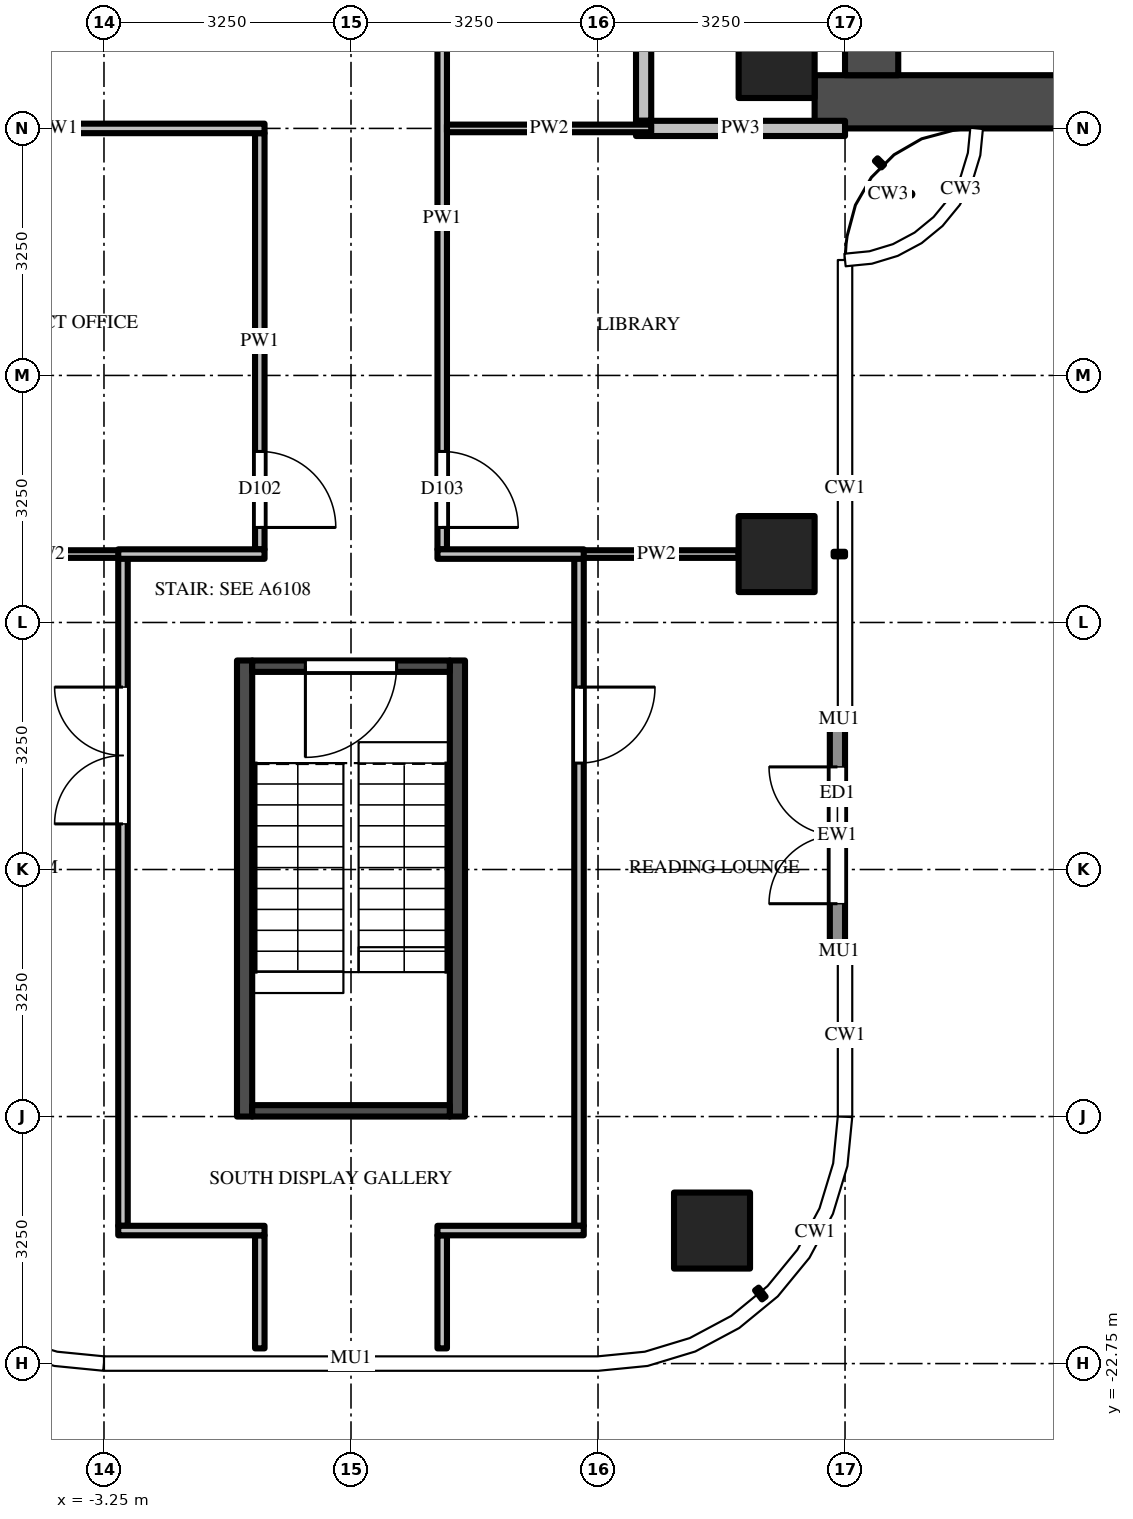
"""IFC4 building model, lengths in metres.
Left out: names, types, materials, properties, quantities, classifications, styles, units other than length and angle.
Written with IfcOpenShell. Run it as: python <this file> out.ifc"""

import sys

from ifc_helpers import new_model, si_unit, direction, frame, frame_2d, origin, origin_2d, place, context, subcontext, project, spatial, rectangle, extrude, source, transform, mapped, element, fill, save


model = new_model("IFC4")
c1 = context("Model", 3, precision=1e-05, world=origin(), true_north=direction((0.0, 1.0)))
c2 = subcontext(c1, "Body", "Model", "MODEL_VIEW")
j1 = project(units=[si_unit("LENGTHUNIT", "METRE"), si_unit("PLANEANGLEUNIT", "RADIAN")], contexts=[c1])
p1 = place(None, origin())
s1 = spatial("IfcSite", under=j1, at=p1, CompositionType="ELEMENT")
p2 = place(p1, origin())
s2 = spatial("IfcBuilding", under=s1, at=p2, CompositionType="ELEMENT")
p3 = place(p2, frame((0.0, 0.0, 326.2)))
s3 = spatial("IfcBuildingStorey", under=s2, at=p3, CompositionType="ELEMENT", Elevation=326.2)
m1 = source(origin(), c2, "Body", "SweptSolid", [
    extrude(rectangle(XDim=1.0, YDim=1.0, at=origin_2d()), origin(), (0.0, 0.0, 1.0), 3.9),
])
for number, where, z_axis, x_axis in (
    (1, (5.6, -5.6, 0.0), (0.0, 0.0, 1.0), (1.0, 0.0, 0.0)),
    (2, (5.6, -12.1, 0.0), (0.0, 0.0, 1.0), (1.0, 0.0, 0.0)),
    (3, (4.75, -21.0, 0.0), (0.0, 0.0, 1.0), (1.0, 0.0, 0.0)),
):
    element("IfcColumn", number, at=place(p3, frame(where, z_axis=z_axis, x_axis=x_axis)), inside=s3, PredefinedType="COLUMN", context=c2, shape_type="MappedRepresentation", body=[
        mapped(m1, transform((0.0, 0.0, 0.0))),
    ])
m2 = source(origin(), c2, "Body", "SweptSolid", [
    extrude(rectangle(XDim=16.65, YDim=0.7, at=frame_2d((8.325, 0.0))), origin(), (0.0, 0.0, 1.0), 3.5),
])
p4 = place(p3, frame((6.1, -6.15, 0.0), z_axis=(0.0, 0.0, 1.0), x_axis=(1.0, 0.0, 0.0)))
e4 = element("IfcWall", 4, at=p4, inside=s3, PredefinedType="SHEAR", context=c2, shape_type="MappedRepresentation", body=[
    mapped(m2, transform((0.0, 0.0, 0.0))),
])
m3 = source(origin(), c2, "Body", "SweptSolid", [
    extrude(rectangle(XDim=9.05, YDim=0.7, at=frame_2d((4.525, 0.0))), origin(), (0.0, 0.0, 1.0), 3.5),
])
p5 = place(p3, frame((6.85, -5.8, 0.0), z_axis=(0.0, 0.0, 1.0), x_axis=(0.0, 1.0, 0.0)))
e5 = element("IfcWall", 5, at=p5, inside=s3, PredefinedType="SHEAR", context=c2, shape_type="MappedRepresentation", body=[
    mapped(m3, transform((0.0, 0.0, 0.0))),
])
m4 = source(origin(), c2, "Body", "SweptSolid", [
    extrude(rectangle(XDim=1.8, YDim=2.1, at=frame_2d((0.9, 1.05))), frame((0.0, 0.36, 0.0), z_axis=(0.0, -1.0, 0.0), x_axis=(1.0, 0.0, 0.0)), (0.0, 0.0, 1.0), 0.72),
])
p6 = place(p5, frame((3.15, 0.0, 0.0)))
e6 = element("IfcOpeningElement", 6, at=p6, cuts=e5, PredefinedType="OPENING", context=c2, shape_type="MappedRepresentation", body=[
    mapped(m4, transform((0.0, 0.0, 0.0))),
])
m5 = source(origin(), c2, "Body", "SweptSolid", [
    extrude(rectangle(XDim=6.0, YDim=0.2, at=frame_2d((3.0, 0.0))), origin(), (0.0, 0.0, 1.0), 3.5),
])
for number, where, z_axis, x_axis in (
    (7, (1.4, -13.5, 0.0), (0.0, 0.0, 1.0), (0.0, -1.0, 0.0)),
    (8, (-1.4, -13.5, 0.0), (0.0, 0.0, 1.0), (0.0, -1.0, 0.0)),
):
    element("IfcWall", number, at=place(p3, frame(where, z_axis=z_axis, x_axis=x_axis)), inside=s3, PredefinedType="SHEAR", context=c2, shape_type="MappedRepresentation", body=[
        mapped(m5, transform((0.0, 0.0, 0.0))),
    ])
m6 = source(origin(), c2, "Body", "SweptSolid", [
    extrude(rectangle(XDim=2.6, YDim=0.15, at=frame_2d((1.3, 0.0))), origin(), (0.0, 0.0, 1.0), 3.5),
])
p7 = place(p3, frame((1.3, -13.575, 0.0), z_axis=(0.0, 0.0, 1.0), x_axis=(-1.0, 0.0, 0.0)))
e9 = element("IfcWall", 9, at=p7, inside=s3, PredefinedType="SHEAR", context=c2, shape_type="MappedRepresentation", body=[
    mapped(m6, transform((0.0, 0.0, 0.0))),
])
m7 = source(origin(), c2, "Body", "SweptSolid", [
    extrude(rectangle(XDim=1.2, YDim=2.1, at=frame_2d((0.6, 1.05))), frame((0.0, 0.085, 0.0), z_axis=(0.0, -1.0, 0.0), x_axis=(1.0, 0.0, 0.0)), (0.0, 0.0, 1.0), 0.17),
])
p8 = place(p7, frame((0.7, 0.0, 0.0)))
e10 = element("IfcOpeningElement", 10, at=p8, cuts=e9, PredefinedType="OPENING", context=c2, shape_type="MappedRepresentation", body=[
    mapped(m7, transform((0.0, 0.0, 0.0))),
])
p9 = place(p3, frame((1.3, -19.425, 0.0), z_axis=(0.0, 0.0, 1.0), x_axis=(-1.0, 0.0, 0.0)))
e11 = element("IfcWall", 11, at=p9, inside=s3, PredefinedType="SHEAR", context=c2, shape_type="MappedRepresentation", body=[
    mapped(m6, transform((0.0, 0.0, 0.0))),
])
p10 = place(p3, frame((6.4, -17.3, 0.0), z_axis=(0.0, 0.0, 1.0), x_axis=(0.0, 1.0, 0.0)))
e12 = element("IfcWall", 12, at=p10, inside=s3, PredefinedType="SOLIDWALL", context=c2, shape_type="SweptSolid", body=[
    extrude(rectangle(XDim=3.0, YDim=0.2, at=frame_2d((1.5, 0.0))), origin(), (0.0, 0.0, 1.0), 3.5),
])
m8 = source(origin(), c2, "Body", "SweptSolid", [
    extrude(rectangle(XDim=1.8, YDim=2.4, at=frame_2d((0.9, 1.2))), frame((0.0, 0.11, 0.0), z_axis=(0.0, -1.0, 0.0), x_axis=(1.0, 0.0, 0.0)), (0.0, 0.0, 1.0), 0.22),
])
p11 = place(p10, frame((0.6, 0.0, 0.0)))
e13 = element("IfcOpeningElement", 13, at=p11, cuts=e12, PredefinedType="OPENING", context=c2, shape_type="MappedRepresentation", body=[
    mapped(m8, transform((0.0, 0.0, 0.0))),
])
m9 = source(origin(), c2, "Body", "SweptSolid", [
    extrude(rectangle(XDim=8.788, YDim=0.125, at=frame_2d((4.394, 0.0))), origin(), (0.0, 0.0, 1.0), 2.58),
])
p12 = place(p3, frame((-3.0, -20.938, 0.0), z_axis=(0.0, 0.0, 1.0), x_axis=(0.0, 1.0, 0.0)))
e14 = element("IfcWall", 14, at=p12, inside=s3, PredefinedType="PARTITIONING", context=c2, shape_type="MappedRepresentation", body=[
    mapped(m9, transform((0.0, 0.0, 0.0))),
])
m10 = source(origin(), c2, "Body", "SweptSolid", [
    extrude(rectangle(XDim=1.8, YDim=2.1, at=frame_2d((0.9, 1.05))), frame((0.0, 0.073, 0.0), z_axis=(0.0, -1.0, 0.0), x_axis=(1.0, 0.0, 0.0)), (0.0, 0.0, 1.0), 0.145),
])
p13 = place(p12, frame((5.288, 0.0, 0.0)))
e15 = element("IfcOpeningElement", 15, at=p13, cuts=e14, PredefinedType="OPENING", context=c2, shape_type="MappedRepresentation", body=[
    mapped(m10, transform((0.0, 0.0, 0.0))),
])
m11 = source(origin(), c2, "Body", "SweptSolid", [
    extrude(rectangle(XDim=1.488, YDim=0.125, at=frame_2d((0.744, 0.0))), origin(), (0.0, 0.0, 1.0), 2.58),
])
p14 = place(p3, frame((-1.2, -21.062, 0.0), z_axis=(0.0, 0.0, 1.0), x_axis=(0.0, -1.0, 0.0)))
e16 = element("IfcWall", 16, at=p14, inside=s3, PredefinedType="PARTITIONING", context=c2, shape_type="MappedRepresentation", body=[
    mapped(m11, transform((0.0, 0.0, 0.0))),
])
m12 = source(origin(), c2, "Body", "SweptSolid", [
    extrude(rectangle(XDim=5.475, YDim=0.125, at=frame_2d((2.738, 0.0))), origin(), (0.0, 0.0, 1.0), 2.718),
])
p15 = place(p3, frame((-1.2, -6.562, 0.0), z_axis=(0.0, 0.0, 1.0), x_axis=(0.0, -1.0, 0.0)))
e17 = element("IfcWall", 17, at=p15, inside=s3, PredefinedType="PARTITIONING", context=c2, shape_type="MappedRepresentation", body=[
    mapped(m12, transform((0.0, 0.0, 0.0))),
])
m13 = source(origin(), c2, "Body", "SweptSolid", [
    extrude(rectangle(XDim=1.0, YDim=2.1, at=frame_2d((0.5, 1.05))), frame((0.0, 0.073, 0.0), z_axis=(0.0, -1.0, 0.0), x_axis=(1.0, 0.0, 0.0)), (0.0, 0.0, 1.0), 0.145),
])
p16 = place(p15, frame((4.188, 0.0, 0.0)))
e18 = element("IfcOpeningElement", 18, at=p16, cuts=e17, PredefinedType="OPENING", context=c2, shape_type="MappedRepresentation", body=[
    mapped(m13, transform((0.0, 0.0, 0.0))),
])
p17 = place(p3, frame((1.2, -21.062, 0.0), z_axis=(0.0, 0.0, 1.0), x_axis=(0.0, -1.0, 0.0)))
e19 = element("IfcWall", 19, at=p17, inside=s3, PredefinedType="PARTITIONING", context=c2, shape_type="MappedRepresentation", body=[
    mapped(m11, transform((0.0, 0.0, 0.0))),
])
p18 = place(p3, frame((1.2, -3.312, 0.0), z_axis=(0.0, 0.0, 1.0), x_axis=(0.0, -1.0, 0.0)))
e20 = element("IfcWall", 20, at=p18, inside=s3, PredefinedType="PARTITIONING", context=c2, shape_type="SweptSolid", body=[
    extrude(rectangle(XDim=8.725, YDim=0.125, at=frame_2d((4.363, 0.0))), origin(), (0.0, 0.0, 1.0), 2.718),
])
p19 = place(p18, frame((7.438, 0.0, 0.0)))
e21 = element("IfcOpeningElement", 21, at=p19, cuts=e20, PredefinedType="OPENING", context=c2, shape_type="MappedRepresentation", body=[
    mapped(m13, transform((0.0, 0.0, 0.0))),
])
m14 = source(origin(), c2, "Body", "SweptSolid", [
    extrude(rectangle(XDim=1.1, YDim=2.1, at=frame_2d((0.55, 1.05))), frame((0.0, 0.073, 0.0), z_axis=(0.0, -1.0, 0.0), x_axis=(1.0, 0.0, 0.0)), (0.0, 0.0, 1.0), 0.145),
])
p20 = place(p18, frame((0.288, 0.0, 0.0)))
e22 = element("IfcOpeningElement", 22, at=p20, cuts=e20, PredefinedType="OPENING", context=c2, shape_type="MappedRepresentation", body=[
    mapped(m14, transform((0.0, 0.0, 0.0))),
])
p21 = place(p3, frame((3.0, -12.15, 0.0), z_axis=(0.0, 0.0, 1.0), x_axis=(0.0, -1.0, 0.0)))
e23 = element("IfcWall", 23, at=p21, inside=s3, PredefinedType="PARTITIONING", context=c2, shape_type="MappedRepresentation", body=[
    mapped(m9, transform((0.0, 0.0, 0.0))),
])
p22 = place(p21, frame((1.7, 0.0, 0.0)))
e24 = element("IfcOpeningElement", 24, at=p22, cuts=e23, PredefinedType="OPENING", context=c2, shape_type="MappedRepresentation", body=[
    mapped(m13, transform((0.0, 0.0, 0.0))),
])
p23 = place(p3, frame((3.85, -6.4, 0.0), z_axis=(0.0, 0.0, 1.0), x_axis=(0.0, 1.0, 0.0)))
e25 = element("IfcWall", 25, at=p23, inside=s3, PredefinedType="PARTITIONING", context=c2, shape_type="SweptSolid", body=[
    extrude(rectangle(XDim=3.087, YDim=0.2, at=frame_2d((1.544, 0.0))), origin(), (0.0, 0.0, 1.0), 2.718),
])
m15 = source(origin(), c2, "Body", "SweptSolid", [
    extrude(rectangle(XDim=1.925, YDim=0.125, at=frame_2d((0.962, 0.0))), origin(), (0.0, 0.0, 1.0), 2.58),
])
for number, where, z_axis, x_axis in (
    (26, (-1.137, -21.0, 0.0), (0.0, 0.0, 1.0), (-1.0, 0.0, 0.0)),
    (27, (3.062, -21.0, 0.0), (0.0, 0.0, 1.0), (-1.0, 0.0, 0.0)),
):
    element("IfcWall", number, at=place(p3, frame(where, z_axis=z_axis, x_axis=x_axis)), inside=s3, PredefinedType="PARTITIONING", context=c2, shape_type="MappedRepresentation", body=[
        mapped(m15, transform((0.0, 0.0, 0.0))),
    ])
m16 = source(origin(), c2, "Body", "SweptSolid", [
    extrude(rectangle(XDim=2.163, YDim=0.1, at=frame_2d((1.081, 0.0))), origin(), (0.0, 0.0, 1.0), 2.718),
])
for number, where, z_axis, x_axis in (
    (28, (-5.1, -12.1, 0.0), (0.0, 0.0, 1.0), (1.0, 0.0, 0.0)),
    (29, (2.938, -12.1, 0.0), (0.0, 0.0, 1.0), (1.0, 0.0, 0.0)),
):
    element("IfcWall", number, at=place(p3, frame(where, z_axis=z_axis, x_axis=x_axis)), inside=s3, PredefinedType="PARTITIONING", context=c2, shape_type="MappedRepresentation", body=[
        mapped(m16, transform((0.0, 0.0, 0.0))),
    ])
m17 = source(origin(), c2, "Body", "SweptSolid", [
    extrude(rectangle(XDim=1.925, YDim=0.125, at=frame_2d((0.962, 0.0))), origin(), (0.0, 0.0, 1.0), 2.718),
])
for number, where, z_axis, x_axis in (
    (30, (-3.062, -12.1, 0.0), (0.0, 0.0, 1.0), (1.0, 0.0, 0.0)),
    (31, (1.137, -12.1, 0.0), (0.0, 0.0, 1.0), (1.0, 0.0, 0.0)),
):
    element("IfcWall", number, at=place(p3, frame(where, z_axis=z_axis, x_axis=x_axis)), inside=s3, PredefinedType="PARTITIONING", context=c2, shape_type="MappedRepresentation", body=[
        mapped(m17, transform((0.0, 0.0, 0.0))),
    ])
p24 = place(p3, frame((3.75, -6.5, 0.0), z_axis=(0.0, 0.0, 1.0), x_axis=(1.0, 0.0, 0.0)))
e32 = element("IfcWall", 32, at=p24, inside=s3, PredefinedType="PARTITIONING", context=c2, shape_type="SweptSolid", body=[
    extrude(rectangle(XDim=2.75, YDim=0.2, at=frame_2d((1.375, 0.0))), origin(), (0.0, 0.0, 1.0), 2.58),
])
p25 = place(p3, frame((1.262, -6.5, 0.0), z_axis=(0.0, 0.0, 1.0), x_axis=(1.0, 0.0, 0.0)))
e33 = element("IfcWall", 33, at=p25, inside=s3, PredefinedType="PARTITIONING", context=c2, shape_type="SweptSolid", body=[
    extrude(rectangle(XDim=2.688, YDim=0.1, at=frame_2d((1.344, 0.0))), origin(), (0.0, 0.0, 1.0), 3.5),
])
m18 = source(origin(), c2, "Body", "SweptSolid", [
    extrude(rectangle(XDim=5.425, YDim=0.125, at=frame_2d((2.712, 0.0))), origin(), (0.0, 0.0, 1.0), 2.58),
])
p26 = place(p3, frame((-1.137, -6.5, 0.0), z_axis=(0.0, 0.0, 1.0), x_axis=(-1.0, 0.0, 0.0)))
e34 = element("IfcWall", 34, at=p26, inside=s3, PredefinedType="PARTITIONING", context=c2, shape_type="MappedRepresentation", body=[
    mapped(m18, transform((0.0, 0.0, 0.0))),
])
m19 = source(origin(), c2, "Body", "SweptSolid", [
    extrude(rectangle(XDim=1.2, YDim=2.1, at=frame_2d((0.6, 1.05))), frame((0.0, 0.025, 0.0), z_axis=(0.0, -1.0, 0.0), x_axis=(1.0, 0.0, 0.0)), (0.0, 0.0, 1.0), 0.05),
])
p27 = place(p8, origin())
e35 = element("IfcDoor", 35, at=p27, inside=s3, OperationType="SINGLE_SWING_RIGHT", PredefinedType="DOOR", context=c2, shape_type="MappedRepresentation", body=[
    mapped(m19, transform((0.0, 0.0, 0.0))),
])
fill(e10, e35)
m20 = source(origin(), c2, "Body", "SweptSolid", [
    extrude(rectangle(XDim=1.8, YDim=2.4, at=frame_2d((0.9, 1.2))), frame((0.0, 0.025, 0.0), z_axis=(0.0, -1.0, 0.0), x_axis=(1.0, 0.0, 0.0)), (0.0, 0.0, 1.0), 0.05),
])
p28 = place(p11, origin())
e36 = element("IfcDoor", 36, at=p28, inside=s3, OperationType="DOUBLE_DOOR_SINGLE_SWING", PredefinedType="DOOR", context=c2, shape_type="MappedRepresentation", body=[
    mapped(m20, transform((0.0, 0.0, 0.0))),
])
fill(e13, e36)
m21 = source(origin(), c2, "Body", "SweptSolid", [
    extrude(rectangle(XDim=1.8, YDim=2.1, at=frame_2d((0.9, 1.05))), frame((0.0, 0.025, 0.0), z_axis=(0.0, -1.0, 0.0), x_axis=(1.0, 0.0, 0.0)), (0.0, 0.0, 1.0), 0.05),
])
p29 = place(p13, origin())
e37 = element("IfcDoor", 37, at=p29, inside=s3, OperationType="DOUBLE_DOOR_SINGLE_SWING", PredefinedType="DOOR", context=c2, shape_type="MappedRepresentation", body=[
    mapped(m21, transform((0.0, 0.0, 0.0))),
])
fill(e15, e37)
m22 = source(origin(), c2, "Body", "SweptSolid", [
    extrude(rectangle(XDim=1.0, YDim=2.1, at=frame_2d((0.5, 1.05))), frame((0.0, 0.025, 0.0), z_axis=(0.0, -1.0, 0.0), x_axis=(1.0, 0.0, 0.0)), (0.0, 0.0, 1.0), 0.05),
])
p30 = place(p22, origin())
e38 = element("IfcDoor", 38, at=p30, inside=s3, OperationType="SINGLE_SWING_LEFT", PredefinedType="DOOR", context=c2, shape_type="MappedRepresentation", body=[
    mapped(m22, transform((0.0, 0.0, 0.0))),
])
fill(e24, e38)
p31 = place(p16, origin())
e39 = element("IfcDoor", 39, at=p31, inside=s3, OperationType="SINGLE_SWING_RIGHT", PredefinedType="DOOR", context=c2, shape_type="MappedRepresentation", body=[
    mapped(m22, transform((0.0, 0.0, 0.0))),
])
fill(e18, e39)
p32 = place(p19, origin())
e40 = element("IfcDoor", 40, at=p32, inside=s3, OperationType="SINGLE_SWING_RIGHT", PredefinedType="DOOR", context=c2, shape_type="MappedRepresentation", body=[
    mapped(m22, transform((0.0, 0.0, 0.0))),
])
fill(e21, e40)
save(model, sys.argv[1])
